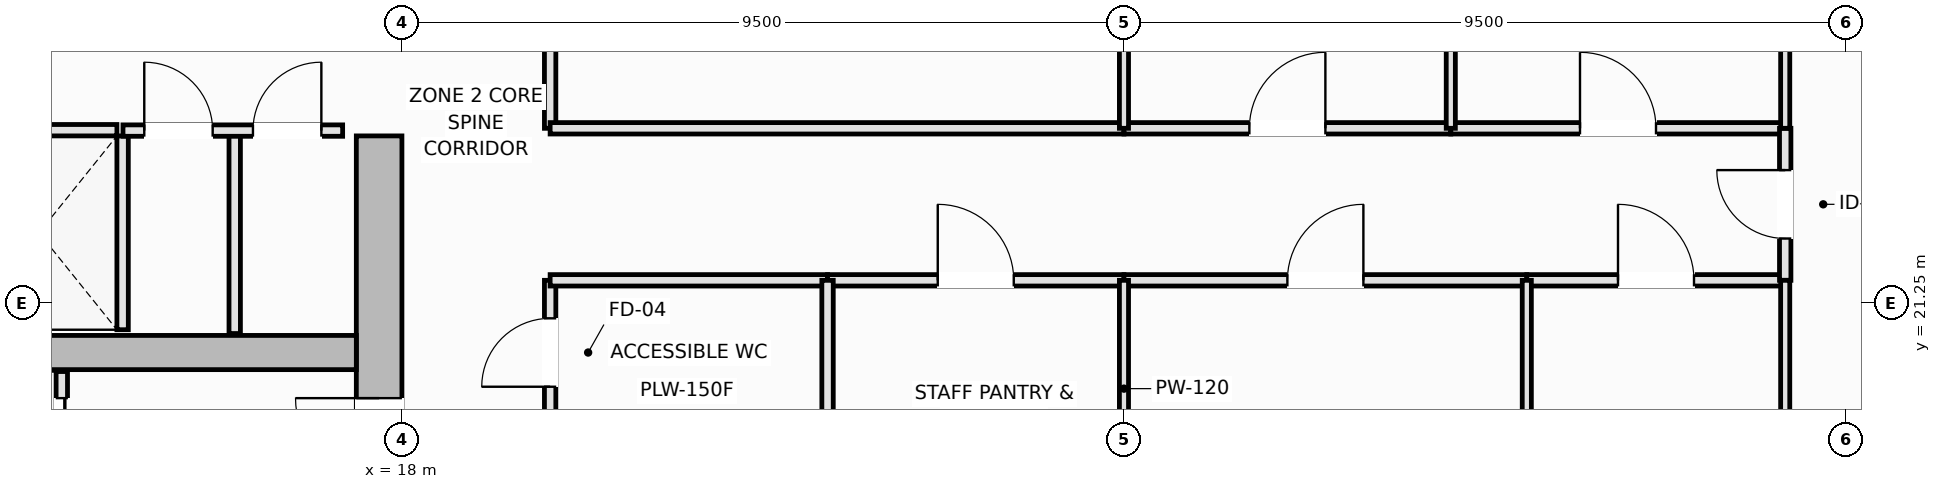
"""IFC4 building model, lengths in metres.
Left out: names, types, materials, properties, quantities, classifications, styles, units other than length and angle.
Written with IfcOpenShell. Run it as: python <this file> out.ifc"""

import sys

from ifc_helpers import new_model, si_unit, direction, frame, frame_2d, origin, place, context, subcontext, project, spatial, rectangle, extrude, element, fill, save


model = new_model("IFC4")
c1 = context("Model", 3, precision=1e-05, world=origin(), true_north=direction((0.0, 1.0)))
c2 = subcontext(c1, "Body", "Model", "MODEL_VIEW")
j1 = project(units=[si_unit("LENGTHUNIT", "METRE"), si_unit("PLANEANGLEUNIT", "RADIAN")], contexts=[c1])
p1 = place(None, origin())
s1 = spatial("IfcSite", under=j1, at=p1, CompositionType="ELEMENT")
p2 = place(p1, origin())
s2 = spatial("IfcBuilding", under=s1, at=p2, CompositionType="ELEMENT")
p3 = place(p2, frame((0.0, 0.0, 134.2)))
s3 = spatial("IfcBuildingStorey", under=s2, at=p3, CompositionType="ELEMENT", Elevation=134.2)
p4 = place(p3, frame((17.7, 14.6, 0.0), z_axis=(0.0, 0.0, 1.0), x_axis=(0.0, 1.0, 0.0)))
e1 = element("IfcWall", 1, at=p4, inside=s3, PredefinedType="SHEAR", context=c2, shape_type="SweptSolid", body=[
    extrude(rectangle(XDim=8.85, YDim=0.6, at=frame_2d((4.425, 0.0))), origin(), (0.0, 0.0, 1.0), 3.55),
])
p5 = place(p4, frame((4.3, 0.0, 0.0)))
e2 = element("IfcOpeningElement", 2, at=p5, cuts=e1, PredefinedType="OPENING", context=c2, shape_type="SweptSolid", body=[
    extrude(rectangle(XDim=1.1, YDim=2.15, at=frame_2d((0.55, 1.075))), frame((0.0, 0.31, 0.0), z_axis=(0.0, -1.0, 0.0), x_axis=(1.0, 0.0, 0.0)), (0.0, 0.0, 1.0), 0.62),
])
p6 = place(p3, frame((5.1, 20.6, 0.0), z_axis=(0.0, 0.0, 1.0), x_axis=(1.0, 0.0, 0.0)))
e3 = element("IfcWall", 3, at=p6, inside=s3, PredefinedType="SHEAR", context=c2, shape_type="SweptSolid", body=[
    extrude(rectangle(XDim=12.3, YDim=0.45, at=frame_2d((6.15, 0.0))), origin(), (0.0, 0.0, 1.0), 3.55),
])
p7 = place(p3, frame((12.2, 23.525, 0.0), z_axis=(0.0, 0.0, 1.0), x_axis=(1.0, 0.0, 0.0)))
e4 = element("IfcWall", 4, at=p7, inside=s3, PredefinedType="PARTITIONING", context=c2, shape_type="SweptSolid", body=[
    extrude(rectangle(XDim=2.05, YDim=0.15, at=frame_2d((1.025, 0.0))), origin(), (0.0, 0.0, 1.0), 3.37),
])
p8 = place(p3, frame((14.325, 20.9, 0.0), z_axis=(0.0, 0.0, 1.0), x_axis=(0.0, 1.0, 0.0)))
e5 = element("IfcWall", 5, at=p8, inside=s3, PredefinedType="PARTITIONING", context=c2, shape_type="SweptSolid", body=[
    extrude(rectangle(XDim=2.55, YDim=0.15, at=frame_2d((1.275, 0.0))), origin(), (0.0, 0.0, 1.0), 3.37),
])
p9 = place(p3, frame((13.525, 18.55, 0.0), z_axis=(0.0, 0.0, 1.0), x_axis=(0.0, 1.0, 0.0)))
e6 = element("IfcWall", 6, at=p9, inside=s3, PredefinedType="PARTITIONING", context=c2, shape_type="SweptSolid", body=[
    extrude(rectangle(XDim=1.8, YDim=0.15, at=frame_2d((0.9, 0.0))), origin(), (0.0, 0.0, 1.0), 3.37),
])
p10 = place(p9, frame((0.35, 0.0, 0.0)))
e7 = element("IfcOpeningElement", 7, at=p10, cuts=e6, PredefinedType="OPENING", context=c2, shape_type="SweptSolid", body=[
    extrude(rectangle(XDim=1.1, YDim=2.2, at=frame_2d((0.55, 1.1))), frame((0.0, 0.085, 0.0), z_axis=(0.0, -1.0, 0.0), x_axis=(1.0, 0.0, 0.0)), (0.0, 0.0, 1.0), 0.17),
])
p11 = place(p3, frame((15.8, 20.85, 0.0), z_axis=(0.0, 0.0, 1.0), x_axis=(0.0, 1.0, 0.0)))
e8 = element("IfcWall", 8, at=p11, inside=s3, PredefinedType="PARTITIONING", context=c2, shape_type="SweptSolid", body=[
    extrude(rectangle(XDim=2.67, YDim=0.15, at=frame_2d((1.335, 0.0))), origin(), (0.0, 0.0, 1.0), 3.37),
])
p12 = place(p3, frame((14.33, 23.52, 0.0), z_axis=(0.0, 0.0, 1.0), x_axis=(1.0, 0.0, 0.0)))
e9 = element("IfcWall", 9, at=p12, inside=s3, PredefinedType="PARTITIONING", context=c2, shape_type="SweptSolid", body=[
    extrude(rectangle(XDim=2.89, YDim=0.15, at=frame_2d((1.445, 0.0))), origin(), (0.0, 0.0, 1.0), 3.37),
])
p13 = place(p12, frame((0.28, 0.0, 0.0)))
e10 = element("IfcOpeningElement", 10, at=p13, cuts=e9, PredefinedType="OPENING", context=c2, shape_type="SweptSolid", body=[
    extrude(rectangle(XDim=0.9, YDim=2.1, at=frame_2d((0.45, 1.05))), frame((0.0, 0.085, 0.0), z_axis=(0.0, -1.0, 0.0), x_axis=(1.0, 0.0, 0.0)), (0.0, 0.0, 1.0), 0.17),
])
p14 = place(p12, frame((1.71, 0.0, 0.0)))
e11 = element("IfcOpeningElement", 11, at=p14, cuts=e9, PredefinedType="OPENING", context=c2, shape_type="SweptSolid", body=[
    extrude(rectangle(XDim=0.9, YDim=2.1, at=frame_2d((0.45, 1.05))), frame((0.0, 0.085, 0.0), z_axis=(0.0, -1.0, 0.0), x_axis=(1.0, 0.0, 0.0)), (0.0, 0.0, 1.0), 0.17),
])
p15 = place(p3, frame((19.95, 19.65, 0.0), z_axis=(0.0, 0.0, 1.0), x_axis=(0.0, 1.0, 0.0)))
e12 = element("IfcWall", 12, at=p15, inside=s3, PredefinedType="PLUMBINGWALL", context=c2, shape_type="SweptSolid", body=[
    extrude(rectangle(XDim=1.9, YDim=0.15, at=frame_2d((0.95, 0.0))), origin(), (0.0, 0.0, 1.0), 3.37),
])
p16 = place(p15, frame((0.5, 0.0, 0.0)))
e13 = element("IfcOpeningElement", 13, at=p16, cuts=e12, PredefinedType="OPENING", context=c2, shape_type="SweptSolid", body=[
    extrude(rectangle(XDim=0.9, YDim=2.1, at=frame_2d((0.45, 1.05))), frame((0.0, 0.085, 0.0), z_axis=(0.0, -1.0, 0.0), x_axis=(1.0, 0.0, 0.0)), (0.0, 0.0, 1.0), 0.17),
])
p17 = place(p3, frame((19.95, 23.55, 0.0), z_axis=(0.0, 0.0, 1.0), x_axis=(0.0, 1.0, 0.0)))
e14 = element("IfcWall", 14, at=p17, inside=s3, PredefinedType="PARTITIONING", context=c2, shape_type="SweptSolid", body=[
    extrude(rectangle(XDim=6.25, YDim=0.15, at=frame_2d((3.125, 0.0))), origin(), (0.0, 0.0, 1.0), 3.37),
])
p18 = place(p17, frame((2.625, 0.0, 0.0)))
e15 = element("IfcOpeningElement", 15, at=p18, cuts=e14, PredefinedType="OPENING", context=c2, shape_type="SweptSolid", body=[
    extrude(rectangle(XDim=1.0, YDim=2.15, at=frame_2d((0.5, 1.075))), frame((0.0, 0.085, 0.0), z_axis=(0.0, -1.0, 0.0), x_axis=(1.0, 0.0, 0.0)), (0.0, 0.0, 1.0), 0.17),
])
p19 = place(p3, frame((19.95, 21.55, 0.0), z_axis=(0.0, 0.0, 1.0), x_axis=(1.0, 0.0, 0.0)))
e16 = element("IfcWall", 16, at=p19, inside=s3, PredefinedType="PLUMBINGWALL", context=c2, shape_type="SweptSolid", body=[
    extrude(rectangle(XDim=3.65, YDim=0.15, at=frame_2d((1.825, 0.0))), origin(), (0.0, 0.0, 1.0), 3.37),
])
p20 = place(p3, frame((23.6, 21.55, 0.0), z_axis=(0.0, 0.0, 1.0), x_axis=(1.0, 0.0, 0.0)))
e17 = element("IfcWall", 17, at=p20, inside=s3, PredefinedType="PARTITIONING", context=c2, shape_type="SweptSolid", body=[
    extrude(rectangle(XDim=3.9, YDim=0.15, at=frame_2d((1.95, 0.0))), origin(), (0.0, 0.0, 1.0), 3.37),
])
p21 = place(p20, frame((1.45, 0.0, 0.0)))
e18 = element("IfcOpeningElement", 18, at=p21, cuts=e17, PredefinedType="OPENING", context=c2, shape_type="SweptSolid", body=[
    extrude(rectangle(XDim=1.0, YDim=2.15, at=frame_2d((0.5, 1.075))), frame((0.0, 0.085, 0.0), z_axis=(0.0, -1.0, 0.0), x_axis=(1.0, 0.0, 0.0)), (0.0, 0.0, 1.0), 0.17),
])
p22 = place(p3, frame((19.95, 23.55, 0.0), z_axis=(0.0, 0.0, 1.0), x_axis=(1.0, 0.0, 0.0)))
e19 = element("IfcWall", 19, at=p22, inside=s3, PredefinedType="PARTITIONING", context=c2, shape_type="SweptSolid", body=[
    extrude(rectangle(XDim=7.55, YDim=0.15, at=frame_2d((3.775, 0.0))), origin(), (0.0, 0.0, 1.0), 3.37),
])
p23 = place(p3, frame((27.5, 21.55, 0.0), z_axis=(0.0, 0.0, 1.0), x_axis=(1.0, 0.0, 0.0)))
e20 = element("IfcWall", 20, at=p23, inside=s3, PredefinedType="PARTITIONING", context=c2, shape_type="SweptSolid", body=[
    extrude(rectangle(XDim=5.3, YDim=0.15, at=frame_2d((2.65, 0.0))), origin(), (0.0, 0.0, 1.0), 3.37),
])
p24 = place(p23, frame((2.15, 0.0, 0.0)))
e21 = element("IfcOpeningElement", 21, at=p24, cuts=e20, PredefinedType="OPENING", context=c2, shape_type="SweptSolid", body=[
    extrude(rectangle(XDim=1.0, YDim=2.15, at=frame_2d((0.5, 1.075))), frame((0.0, 0.085, 0.0), z_axis=(0.0, -1.0, 0.0), x_axis=(1.0, 0.0, 0.0)), (0.0, 0.0, 1.0), 0.17),
])
p25 = place(p3, frame((32.8, 21.55, 0.0), z_axis=(0.0, 0.0, 1.0), x_axis=(1.0, 0.0, 0.0)))
e22 = element("IfcWall", 22, at=p25, inside=s3, PredefinedType="PARTITIONING", context=c2, shape_type="SweptSolid", body=[
    extrude(rectangle(XDim=3.4, YDim=0.15, at=frame_2d((1.7, 0.0))), origin(), (0.0, 0.0, 1.0), 3.37),
])
p26 = place(p25, frame((1.2, 0.0, 0.0)))
e23 = element("IfcOpeningElement", 23, at=p26, cuts=e22, PredefinedType="OPENING", context=c2, shape_type="SweptSolid", body=[
    extrude(rectangle(XDim=1.0, YDim=2.15, at=frame_2d((0.5, 1.075))), frame((0.0, 0.085, 0.0), z_axis=(0.0, -1.0, 0.0), x_axis=(1.0, 0.0, 0.0)), (0.0, 0.0, 1.0), 0.17),
])
p27 = place(p3, frame((27.5, 23.55, 0.0), z_axis=(0.0, 0.0, 1.0), x_axis=(1.0, 0.0, 0.0)))
e24 = element("IfcWall", 24, at=p27, inside=s3, PredefinedType="PARTITIONING", context=c2, shape_type="SweptSolid", body=[
    extrude(rectangle(XDim=4.3, YDim=0.15, at=frame_2d((2.15, 0.0))), origin(), (0.0, 0.0, 1.0), 3.37),
])
p28 = place(p27, frame((1.65, 0.0, 0.0)))
e25 = element("IfcOpeningElement", 25, at=p28, cuts=e24, PredefinedType="OPENING", context=c2, shape_type="SweptSolid", body=[
    extrude(rectangle(XDim=1.0, YDim=2.15, at=frame_2d((0.5, 1.075))), frame((0.0, 0.085, 0.0), z_axis=(0.0, -1.0, 0.0), x_axis=(1.0, 0.0, 0.0)), (0.0, 0.0, 1.0), 0.17),
])
p29 = place(p3, frame((31.8, 23.55, 0.0), z_axis=(0.0, 0.0, 1.0), x_axis=(1.0, 0.0, 0.0)))
e26 = element("IfcWall", 26, at=p29, inside=s3, PredefinedType="PARTITIONING", context=c2, shape_type="SweptSolid", body=[
    extrude(rectangle(XDim=4.4, YDim=0.15, at=frame_2d((2.2, 0.0))), origin(), (0.0, 0.0, 1.0), 3.37),
])
p30 = place(p29, frame((1.7, 0.0, 0.0)))
e27 = element("IfcOpeningElement", 27, at=p30, cuts=e26, PredefinedType="OPENING", context=c2, shape_type="SweptSolid", body=[
    extrude(rectangle(XDim=1.0, YDim=2.15, at=frame_2d((0.5, 1.075))), frame((0.0, 0.085, 0.0), z_axis=(0.0, -1.0, 0.0), x_axis=(1.0, 0.0, 0.0)), (0.0, 0.0, 1.0), 0.17),
])
p31 = place(p3, frame((36.2, 21.55, 0.0), z_axis=(0.0, 0.0, 1.0), x_axis=(0.0, 1.0, 0.0)))
e28 = element("IfcWall", 28, at=p31, inside=s3, PredefinedType="PARTITIONING", context=c2, shape_type="SweptSolid", body=[
    extrude(rectangle(XDim=2.0, YDim=0.15, at=frame_2d((1.0, 0.0))), origin(), (0.0, 0.0, 1.0), 3.37),
])
p32 = place(p31, frame((0.55, 0.0, 0.0)))
e29 = element("IfcOpeningElement", 29, at=p32, cuts=e28, PredefinedType="OPENING", context=c2, shape_type="SweptSolid", body=[
    extrude(rectangle(XDim=0.9, YDim=2.1, at=frame_2d((0.45, 1.05))), frame((0.0, 0.085, 0.0), z_axis=(0.0, -1.0, 0.0), x_axis=(1.0, 0.0, 0.0)), (0.0, 0.0, 1.0), 0.17),
])
p33 = place(p3, frame((23.6, 19.65, 0.0), z_axis=(0.0, 0.0, 1.0), x_axis=(0.0, 1.0, 0.0)))
e30 = element("IfcWall", 30, at=p33, inside=s3, PredefinedType="PLUMBINGWALL", context=c2, shape_type="SweptSolid", body=[
    extrude(rectangle(XDim=1.9, YDim=0.15, at=frame_2d((0.95, 0.0))), origin(), (0.0, 0.0, 1.0), 3.37),
])
p34 = place(p3, frame((27.5, 18.7, 0.0), z_axis=(0.0, 0.0, 1.0), x_axis=(0.0, 1.0, 0.0)))
e31 = element("IfcWall", 31, at=p34, inside=s3, PredefinedType="PARTITIONING", context=c2, shape_type="SweptSolid", body=[
    extrude(rectangle(XDim=2.85, YDim=0.12, at=frame_2d((1.425, 0.0))), origin(), (0.0, 0.0, 1.0), 3.37),
])
p35 = place(p3, frame((27.5, 23.55, 0.0), z_axis=(0.0, 0.0, 1.0), x_axis=(0.0, 1.0, 0.0)))
e32 = element("IfcWall", 32, at=p35, inside=s3, PredefinedType="PARTITIONING", context=c2, shape_type="SweptSolid", body=[
    extrude(rectangle(XDim=6.25, YDim=0.12, at=frame_2d((3.125, 0.0))), origin(), (0.0, 0.0, 1.0), 3.37),
])
for number, where, z_axis, x_axis in (
    (33, (32.8, 3.51, 0.0), (0.0, 0.0, 1.0), (0.0, 1.0, 0.0)),
    (34, (36.2, 3.51, 0.0), (0.0, 0.0, 1.0), (0.0, 1.0, 0.0)),
):
    element("IfcWall", number, at=place(p3, frame(where, z_axis=z_axis, x_axis=x_axis)), inside=s3, PredefinedType="PARTITIONING", context=c2, shape_type="SweptSolid", body=[
        extrude(rectangle(XDim=18.04, YDim=0.12, at=frame_2d((9.02, 0.0))), origin(), (0.0, 0.0, 1.0), 3.37),
    ])
for number, where, z_axis, x_axis in (
    (35, (31.8, 23.55, 0.0), (0.0, 0.0, 1.0), (0.0, 1.0, 0.0)),
    (36, (36.2, 23.55, 0.0), (0.0, 0.0, 1.0), (0.0, 1.0, 0.0)),
):
    element("IfcWall", number, at=place(p3, frame(where, z_axis=z_axis, x_axis=x_axis)), inside=s3, PredefinedType="PARTITIONING", context=c2, shape_type="SweptSolid", body=[
        extrude(rectangle(XDim=22.94, YDim=0.12, at=frame_2d((11.47, 0.0))), origin(), (0.0, 0.0, 1.0), 3.37),
    ])
p36 = place(p10, origin())
e37 = element("IfcDoor", 37, at=p36, inside=s3, OperationType="DOUBLE_DOOR_SLIDING", PredefinedType="DOOR", context=c2, shape_type="SweptSolid", body=[
    extrude(rectangle(XDim=1.1, YDim=2.2, at=frame_2d((0.55, 1.1))), frame((0.0, 0.025, 0.0), z_axis=(0.0, -1.0, 0.0), x_axis=(1.0, 0.0, 0.0)), (0.0, 0.0, 1.0), 0.05),
])
fill(e7, e37)
p37 = place(p5, origin())
e38 = element("IfcDoor", 38, at=p37, inside=s3, OperationType="SINGLE_SWING_RIGHT", PredefinedType="DOOR", context=c2, shape_type="SweptSolid", body=[
    extrude(rectangle(XDim=1.1, YDim=2.15, at=frame_2d((0.55, 1.075))), frame((0.0, 0.025, 0.0), z_axis=(0.0, -1.0, 0.0), x_axis=(1.0, 0.0, 0.0)), (0.0, 0.0, 1.0), 0.05),
])
fill(e2, e38)
p38 = place(p13, origin())
e39 = element("IfcDoor", 39, at=p38, inside=s3, OperationType="SINGLE_SWING_LEFT", PredefinedType="DOOR", context=c2, shape_type="SweptSolid", body=[
    extrude(rectangle(XDim=0.9, YDim=2.1, at=frame_2d((0.45, 1.05))), frame((0.0, 0.025, 0.0), z_axis=(0.0, -1.0, 0.0), x_axis=(1.0, 0.0, 0.0)), (0.0, 0.0, 1.0), 0.05),
])
fill(e10, e39)
p39 = place(p14, origin())
e40 = element("IfcDoor", 40, at=p39, inside=s3, OperationType="SINGLE_SWING_RIGHT", PredefinedType="DOOR", context=c2, shape_type="SweptSolid", body=[
    extrude(rectangle(XDim=0.9, YDim=2.1, at=frame_2d((0.45, 1.05))), frame((0.0, 0.025, 0.0), z_axis=(0.0, -1.0, 0.0), x_axis=(1.0, 0.0, 0.0)), (0.0, 0.0, 1.0), 0.05),
])
fill(e11, e40)
p40 = place(p16, origin())
e41 = element("IfcDoor", 41, at=p40, inside=s3, OperationType="SINGLE_SWING_LEFT", PredefinedType="DOOR", context=c2, shape_type="SweptSolid", body=[
    extrude(rectangle(XDim=0.9, YDim=2.1, at=frame_2d((0.45, 1.05))), frame((0.0, 0.025, 0.0), z_axis=(0.0, -1.0, 0.0), x_axis=(1.0, 0.0, 0.0)), (0.0, 0.0, 1.0), 0.05),
])
fill(e13, e41)
p41 = place(p21, origin())
e42 = element("IfcDoor", 42, at=p41, inside=s3, OperationType="SINGLE_SWING_LEFT", PredefinedType="DOOR", context=c2, shape_type="SweptSolid", body=[
    extrude(rectangle(XDim=1.0, YDim=2.15, at=frame_2d((0.5, 1.075))), frame((0.0, 0.025, 0.0), z_axis=(0.0, -1.0, 0.0), x_axis=(1.0, 0.0, 0.0)), (0.0, 0.0, 1.0), 0.05),
])
fill(e18, e42)
p42 = place(p24, origin())
e43 = element("IfcDoor", 43, at=p42, inside=s3, OperationType="SINGLE_SWING_RIGHT", PredefinedType="DOOR", context=c2, shape_type="SweptSolid", body=[
    extrude(rectangle(XDim=1.0, YDim=2.15, at=frame_2d((0.5, 1.075))), frame((0.0, 0.025, 0.0), z_axis=(0.0, -1.0, 0.0), x_axis=(1.0, 0.0, 0.0)), (0.0, 0.0, 1.0), 0.05),
])
fill(e21, e43)
p43 = place(p26, origin())
e44 = element("IfcDoor", 44, at=p43, inside=s3, OperationType="SINGLE_SWING_LEFT", PredefinedType="DOOR", context=c2, shape_type="SweptSolid", body=[
    extrude(rectangle(XDim=1.0, YDim=2.15, at=frame_2d((0.5, 1.075))), frame((0.0, 0.025, 0.0), z_axis=(0.0, -1.0, 0.0), x_axis=(1.0, 0.0, 0.0)), (0.0, 0.0, 1.0), 0.05),
])
fill(e23, e44)
p44 = place(p28, origin())
e45 = element("IfcDoor", 45, at=p44, inside=s3, OperationType="SINGLE_SWING_RIGHT", PredefinedType="DOOR", context=c2, shape_type="SweptSolid", body=[
    extrude(rectangle(XDim=1.0, YDim=2.15, at=frame_2d((0.5, 1.075))), frame((0.0, 0.025, 0.0), z_axis=(0.0, -1.0, 0.0), x_axis=(1.0, 0.0, 0.0)), (0.0, 0.0, 1.0), 0.05),
])
fill(e25, e45)
p45 = place(p30, origin())
e46 = element("IfcDoor", 46, at=p45, inside=s3, OperationType="SINGLE_SWING_LEFT", PredefinedType="DOOR", context=c2, shape_type="SweptSolid", body=[
    extrude(rectangle(XDim=1.0, YDim=2.15, at=frame_2d((0.5, 1.075))), frame((0.0, 0.025, 0.0), z_axis=(0.0, -1.0, 0.0), x_axis=(1.0, 0.0, 0.0)), (0.0, 0.0, 1.0), 0.05),
])
fill(e27, e46)
p46 = place(p32, origin())
e47 = element("IfcDoor", 47, at=p46, inside=s3, OperationType="SINGLE_SWING_RIGHT", PredefinedType="DOOR", context=c2, shape_type="SweptSolid", body=[
    extrude(rectangle(XDim=0.9, YDim=2.1, at=frame_2d((0.45, 1.05))), frame((0.0, 0.025, 0.0), z_axis=(0.0, -1.0, 0.0), x_axis=(1.0, 0.0, 0.0)), (0.0, 0.0, 1.0), 0.05),
])
fill(e29, e47)
save(model, sys.argv[1])
